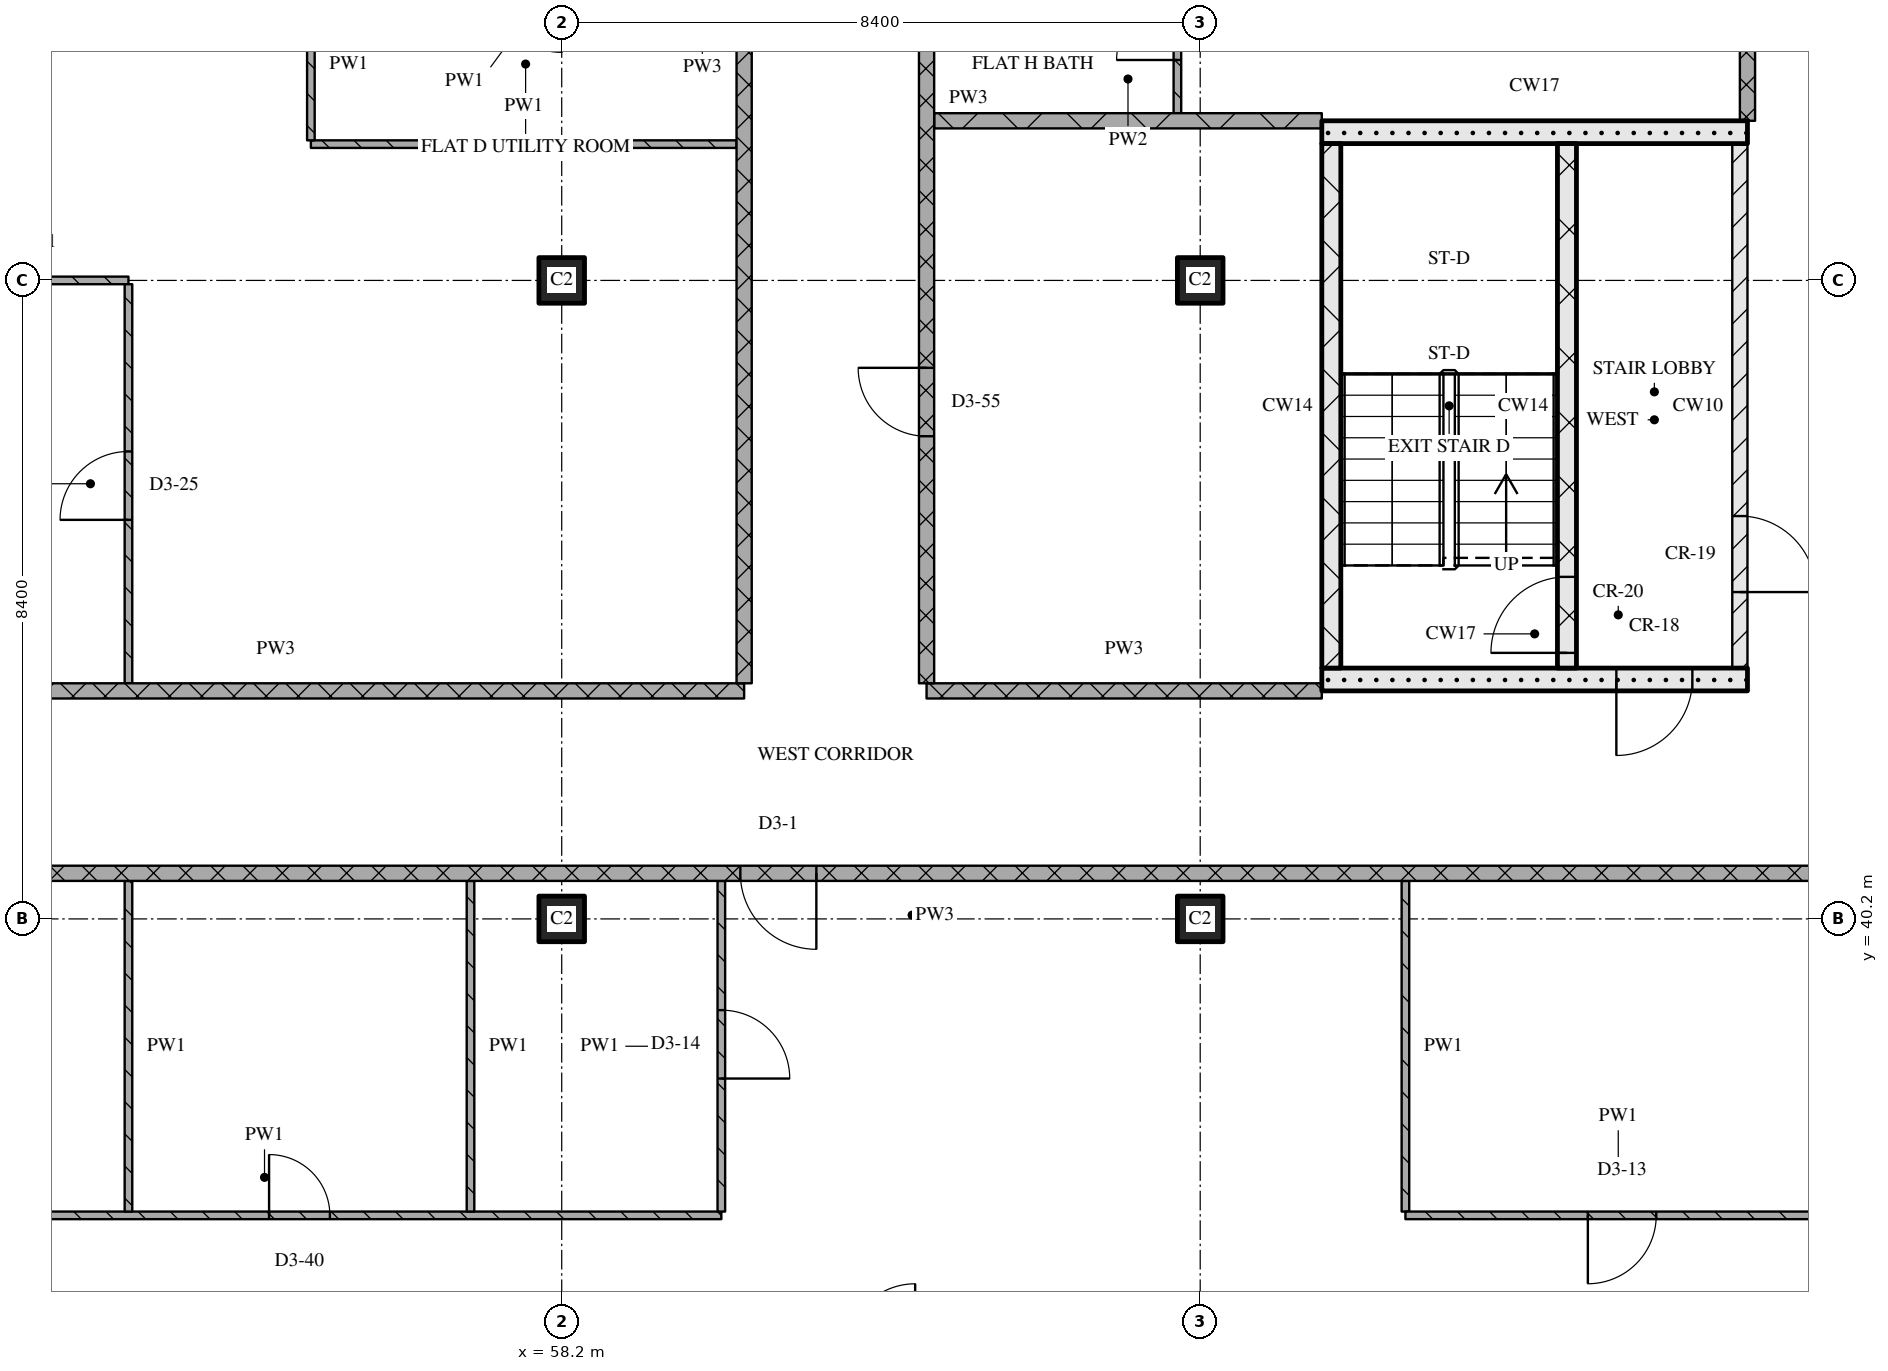
"""IFC4 building model, lengths in metres.
Left out: names, types, materials, properties, quantities, classifications, styles, units other than length and angle.
Written with IfcOpenShell. Run it as: python <this file> out.ifc"""

import sys

from ifc_helpers import new_model, si_unit, direction, frame, frame_2d, origin, origin_2d, place, context, subcontext, project, spatial, rectangle, extrude, element, fill, save


model = new_model("IFC4")
c1 = context("Model", 3, precision=1e-05, world=origin(), true_north=direction((0.0, 1.0)))
c2 = subcontext(c1, "Body", "Model", "MODEL_VIEW")
j1 = project(units=[si_unit("LENGTHUNIT", "METRE"), si_unit("PLANEANGLEUNIT", "RADIAN")], contexts=[c1])
p1 = place(None, origin())
s1 = spatial("IfcSite", under=j1, at=p1, CompositionType="ELEMENT")
p2 = place(p1, origin())
s2 = spatial("IfcBuilding", under=s1, at=p2, CompositionType="ELEMENT")
p3 = place(p2, frame((0.0, 0.0, 234.3)))
s3 = spatial("IfcBuildingStorey", under=s2, at=p3, CompositionType="ELEMENT", Elevation=234.3)
for number, where, z_axis, x_axis in (
    (1, (58.2, 40.2, 0.0), (0.0, 0.0, 1.0), (1.0, 0.0, 0.0)),
    (2, (58.2, 48.6, 0.0), (0.0, 0.0, 1.0), (1.0, 0.0, 0.0)),
    (3, (66.6, 40.2, 0.0), (0.0, 0.0, 1.0), (1.0, 0.0, 0.0)),
    (4, (66.6, 48.6, 0.0), (0.0, 0.0, 1.0), (1.0, 0.0, 0.0)),
):
    element("IfcColumn", number, at=place(p3, frame(where, z_axis=z_axis, x_axis=x_axis)), inside=s3, PredefinedType="COLUMN", context=c2, shape_type="SweptSolid", body=[
        extrude(rectangle(XDim=0.6, YDim=0.6, at=origin_2d()), origin(), (0.0, 0.0, 1.0), 3.6),
    ])
p4 = place(p3, frame((68.2, 43.35, 0.0), z_axis=(0.0, 0.0, 1.0), x_axis=(1.0, 0.0, 0.0)))
e5 = element("IfcWall", 5, at=p4, inside=s3, PredefinedType="SOLIDWALL", context=c2, shape_type="SweptSolid", body=[
    extrude(rectangle(XDim=5.6, YDim=0.3, at=frame_2d((2.8, 0.0))), origin(), (0.0, 0.0, 1.0), 3.32),
])
p5 = place(p4, frame((3.875, 0.0, 0.0)))
e6 = element("IfcOpeningElement", 6, at=p5, cuts=e5, PredefinedType="OPENING", context=c2, shape_type="SweptSolid", body=[
    extrude(rectangle(XDim=1.0, YDim=2.1, at=frame_2d((0.5, 1.05))), frame((0.0, 0.16, 0.0), z_axis=(0.0, -1.0, 0.0), x_axis=(1.0, 0.0, 0.0)), (0.0, 0.0, 1.0), 0.32),
])
p6 = place(p3, frame((68.325, 43.5, 0.0), z_axis=(0.0, 0.0, 1.0), x_axis=(0.0, 1.0, 0.0)))
e7 = element("IfcWall", 7, at=p6, inside=s3, PredefinedType="SOLIDWALL", context=c2, shape_type="SweptSolid", body=[
    extrude(rectangle(XDim=6.9, YDim=0.25, at=frame_2d((3.45, 0.0))), origin(), (0.0, 0.0, 1.0), 3.32),
])
p7 = place(p3, frame((71.425, 43.5, 0.0), z_axis=(0.0, 0.0, 1.0), x_axis=(0.0, 1.0, 0.0)))
e8 = element("IfcWall", 8, at=p7, inside=s3, PredefinedType="SOLIDWALL", context=c2, shape_type="SweptSolid", body=[
    extrude(rectangle(XDim=6.9, YDim=0.25, at=frame_2d((3.45, 0.0))), origin(), (0.0, 0.0, 1.0), 3.32),
])
p8 = place(p7, frame((0.2, 0.0, 0.0)))
e9 = element("IfcOpeningElement", 9, at=p8, cuts=e8, PredefinedType="OPENING", context=c2, shape_type="SweptSolid", body=[
    extrude(rectangle(XDim=1.0, YDim=2.1, at=frame_2d((0.5, 1.05))), frame((0.0, 0.135, 0.0), z_axis=(0.0, -1.0, 0.0), x_axis=(1.0, 0.0, 0.0)), (0.0, 0.0, 1.0), 0.27),
])
p9 = place(p3, frame((73.7, 43.5, 0.0), z_axis=(0.0, 0.0, 1.0), x_axis=(0.0, 1.0, 0.0)))
e10 = element("IfcWall", 10, at=p9, inside=s3, PredefinedType="PARTITIONING", context=c2, shape_type="SweptSolid", body=[
    extrude(rectangle(XDim=6.9, YDim=0.2, at=frame_2d((3.45, 0.0))), origin(), (0.0, 0.0, 1.0), 3.32),
])
p10 = place(p9, frame((1.0, 0.0, 0.0)))
e11 = element("IfcOpeningElement", 11, at=p10, cuts=e10, PredefinedType="OPENING", context=c2, shape_type="SweptSolid", body=[
    extrude(rectangle(XDim=1.0, YDim=2.1, at=frame_2d((0.5, 1.05))), frame((0.0, 0.11, 0.0), z_axis=(0.0, -1.0, 0.0), x_axis=(1.0, 0.0, 0.0)), (0.0, 0.0, 1.0), 0.22),
])
p11 = place(p3, frame((68.2, 50.55, 0.0), z_axis=(0.0, 0.0, 1.0), x_axis=(1.0, 0.0, 0.0)))
e12 = element("IfcWall", 12, at=p11, inside=s3, PredefinedType="SOLIDWALL", context=c2, shape_type="SweptSolid", body=[
    extrude(rectangle(XDim=5.6, YDim=0.3, at=frame_2d((2.8, 0.0))), origin(), (0.0, 0.0, 1.0), 3.32),
])
p12 = place(p3, frame((48.28, 36.3, 0.0), z_axis=(0.0, 0.0, 1.0), x_axis=(1.0, 0.0, 0.0)))
e13 = element("IfcWall", 13, at=p12, inside=s3, PredefinedType="PARTITIONING", context=c2, shape_type="SweptSolid", body=[
    extrude(rectangle(XDim=12.02, YDim=0.1, at=frame_2d((6.01, 0.0))), origin(), (0.0, 0.0, 1.0), 3.32),
])
p13 = place(p12, frame((1.57, 0.0, 0.0)))
e14 = element("IfcOpeningElement", 14, at=p13, cuts=e13, PredefinedType="OPENING", context=c2, shape_type="SweptSolid", body=[
    extrude(rectangle(XDim=0.8, YDim=2.1, at=frame_2d((0.4, 1.05))), frame((0.0, 0.06, 0.0), z_axis=(0.0, -1.0, 0.0), x_axis=(1.0, 0.0, 0.0)), (0.0, 0.0, 1.0), 0.12),
])
p14 = place(p12, frame((6.07, 0.0, 0.0)))
e15 = element("IfcOpeningElement", 15, at=p14, cuts=e13, PredefinedType="OPENING", context=c2, shape_type="SweptSolid", body=[
    extrude(rectangle(XDim=0.8, YDim=2.1, at=frame_2d((0.4, 1.05))), frame((0.0, 0.06, 0.0), z_axis=(0.0, -1.0, 0.0), x_axis=(1.0, 0.0, 0.0)), (0.0, 0.0, 1.0), 0.12),
])
p15 = place(p3, frame((75.0, 40.8, 0.0), z_axis=(0.0, 0.0, 1.0), x_axis=(-1.0, 0.0, 0.0)))
e16 = element("IfcWall", 16, at=p15, inside=s3, PredefinedType="PARTITIONING", context=c2, shape_type="SweptSolid", body=[
    extrude(rectangle(XDim=24.38, YDim=0.2, at=frame_2d((12.19, 0.0))), origin(), (0.0, 0.0, 1.0), 3.32),
])
p16 = place(p15, frame((13.45, 0.0, 0.0)))
e17 = element("IfcOpeningElement", 17, at=p16, cuts=e16, PredefinedType="OPENING", context=c2, shape_type="SweptSolid", body=[
    extrude(rectangle(XDim=1.0, YDim=2.1, at=frame_2d((0.5, 1.05))), frame((0.0, 0.11, 0.0), z_axis=(0.0, -1.0, 0.0), x_axis=(1.0, 0.0, 0.0)), (0.0, 0.0, 1.0), 0.22),
])
p17 = place(p3, frame((48.28, 43.2, 0.0), z_axis=(0.0, 0.0, 1.0), x_axis=(1.0, 0.0, 0.0)))
e18 = element("IfcWall", 18, at=p17, inside=s3, PredefinedType="PARTITIONING", context=c2, shape_type="SweptSolid", body=[
    extrude(rectangle(XDim=12.32, YDim=0.2, at=frame_2d((6.16, 0.0))), origin(), (0.0, 0.0, 1.0), 3.32),
])
p18 = place(p3, frame((63.0, 43.2, 0.0), z_axis=(0.0, 0.0, 1.0), x_axis=(1.0, 0.0, 0.0)))
e19 = element("IfcWall", 19, at=p18, inside=s3, PredefinedType="PARTITIONING", context=c2, shape_type="SweptSolid", body=[
    extrude(rectangle(XDim=5.2, YDim=0.2, at=frame_2d((2.6, 0.0))), origin(), (0.0, 0.0, 1.0), 3.32),
])
p19 = place(p3, frame((50.12, 48.6, 0.0), z_axis=(0.0, 0.0, 1.0), x_axis=(1.0, 0.0, 0.0)))
e20 = element("IfcWall", 20, at=p19, inside=s3, PredefinedType="PARTITIONING", context=c2, shape_type="SweptSolid", body=[
    extrude(rectangle(XDim=2.38, YDim=0.1, at=frame_2d((1.19, 0.0))), origin(), (0.0, 0.0, 1.0), 3.32),
])
p20 = place(p3, frame((54.9, 50.393, 0.0), z_axis=(0.0, 0.0, 1.0), x_axis=(1.0, 0.0, 0.0)))
e21 = element("IfcWall", 21, at=p20, inside=s3, PredefinedType="PARTITIONING", context=c2, shape_type="SweptSolid", body=[
    extrude(rectangle(XDim=5.6, YDim=0.1, at=frame_2d((2.8, 0.0))), origin(), (0.0, 0.0, 1.0), 3.32),
])
p21 = place(p3, frame((63.1, 50.7, 0.0), z_axis=(0.0, 0.0, 1.0), x_axis=(1.0, 0.0, 0.0)))
e22 = element("IfcWall", 22, at=p21, inside=s3, PredefinedType="PARTITIONING", context=c2, shape_type="SweptSolid", body=[
    extrude(rectangle(XDim=5.1, YDim=0.2, at=frame_2d((2.55, 0.0))), origin(), (0.0, 0.0, 1.0), 3.32),
])
p22 = place(p3, frame((52.5, 40.7, 0.0), z_axis=(0.0, 0.0, 1.0), x_axis=(0.0, -1.0, 0.0)))
e23 = element("IfcWall", 23, at=p22, inside=s3, PredefinedType="PARTITIONING", context=c2, shape_type="SweptSolid", body=[
    extrude(rectangle(XDim=4.35, YDim=0.1, at=frame_2d((2.175, 0.0))), origin(), (0.0, 0.0, 1.0), 3.32),
])
p23 = place(p3, frame((52.5, 43.3, 0.0), z_axis=(0.0, 0.0, 1.0), x_axis=(0.0, 1.0, 0.0)))
e24 = element("IfcWall", 24, at=p23, inside=s3, PredefinedType="PARTITIONING", context=c2, shape_type="SweptSolid", body=[
    extrude(rectangle(XDim=5.25, YDim=0.1, at=frame_2d((2.625, 0.0))), origin(), (0.0, 0.0, 1.0), 3.32),
])
p24 = place(p23, frame((2.15, 0.0, 0.0)))
e25 = element("IfcOpeningElement", 25, at=p24, cuts=e24, PredefinedType="OPENING", context=c2, shape_type="SweptSolid", body=[
    extrude(rectangle(XDim=0.9, YDim=2.1, at=frame_2d((0.45, 1.05))), frame((0.0, 0.06, 0.0), z_axis=(0.0, -1.0, 0.0), x_axis=(1.0, 0.0, 0.0)), (0.0, 0.0, 1.0), 0.12),
])
p25 = place(p3, frame((54.9, 52.45, 0.0), z_axis=(0.0, 0.0, 1.0), x_axis=(0.0, -1.0, 0.0)))
e26 = element("IfcWall", 26, at=p25, inside=s3, PredefinedType="PARTITIONING", context=c2, shape_type="SweptSolid", body=[
    extrude(rectangle(XDim=2.007, YDim=0.1, at=frame_2d((1.003, 0.0))), origin(), (0.0, 0.0, 1.0), 3.32),
])
p26 = place(p3, frame((57.0, 40.7, 0.0), z_axis=(0.0, 0.0, 1.0), x_axis=(0.0, -1.0, 0.0)))
e27 = element("IfcWall", 27, at=p26, inside=s3, PredefinedType="PARTITIONING", context=c2, shape_type="SweptSolid", body=[
    extrude(rectangle(XDim=4.35, YDim=0.1, at=frame_2d((2.175, 0.0))), origin(), (0.0, 0.0, 1.0), 3.32),
])
p27 = place(p3, frame((60.3, 36.35, 0.0), z_axis=(0.0, 0.0, 1.0), x_axis=(0.0, 1.0, 0.0)))
e28 = element("IfcWall", 28, at=p27, inside=s3, PredefinedType="PARTITIONING", context=c2, shape_type="SweptSolid", body=[
    extrude(rectangle(XDim=4.35, YDim=0.1, at=frame_2d((2.175, 0.0))), origin(), (0.0, 0.0, 1.0), 3.32),
])
p28 = place(p27, frame((1.75, 0.0, 0.0)))
e29 = element("IfcOpeningElement", 29, at=p28, cuts=e28, PredefinedType="OPENING", context=c2, shape_type="SweptSolid", body=[
    extrude(rectangle(XDim=0.9, YDim=2.1, at=frame_2d((0.45, 1.05))), frame((0.0, 0.06, 0.0), z_axis=(0.0, -1.0, 0.0), x_axis=(1.0, 0.0, 0.0)), (0.0, 0.0, 1.0), 0.12),
])
p29 = place(p3, frame((60.6, 43.3, 0.0), z_axis=(0.0, 0.0, 1.0), x_axis=(0.0, 1.0, 0.0)))
e30 = element("IfcWall", 30, at=p29, inside=s3, PredefinedType="PARTITIONING", context=c2, shape_type="SweptSolid", body=[
    extrude(rectangle(XDim=17.8, YDim=0.2, at=frame_2d((8.9, 0.0))), origin(), (0.0, 0.0, 1.0), 3.32),
])
p30 = place(p29, frame((9.45, 0.0, 0.0)))
e31 = element("IfcOpeningElement", 31, at=p30, cuts=e30, PredefinedType="OPENING", context=c2, shape_type="SweptSolid", body=[
    extrude(rectangle(XDim=1.0, YDim=2.1, at=frame_2d((0.5, 1.05))), frame((0.0, 0.11, 0.0), z_axis=(0.0, -1.0, 0.0), x_axis=(1.0, 0.0, 0.0)), (0.0, 0.0, 1.0), 0.22),
])
p31 = place(p3, frame((63.0, 58.7, 0.0), z_axis=(0.0, 0.0, 1.0), x_axis=(0.0, -1.0, 0.0)))
e32 = element("IfcWall", 32, at=p31, inside=s3, PredefinedType="PARTITIONING", context=c2, shape_type="SweptSolid", body=[
    extrude(rectangle(XDim=15.4, YDim=0.2, at=frame_2d((7.7, 0.0))), origin(), (0.0, 0.0, 1.0), 3.32),
])
p32 = place(p31, frame((4.35, 0.0, 0.0)))
e33 = element("IfcOpeningElement", 33, at=p32, cuts=e32, PredefinedType="OPENING", context=c2, shape_type="SweptSolid", body=[
    extrude(rectangle(XDim=1.0, YDim=2.1, at=frame_2d((0.5, 1.05))), frame((0.0, 0.11, 0.0), z_axis=(0.0, -1.0, 0.0), x_axis=(1.0, 0.0, 0.0)), (0.0, 0.0, 1.0), 0.22),
])
p33 = place(p31, frame((11.25, 0.0, 0.0)))
e34 = element("IfcOpeningElement", 34, at=p33, cuts=e32, PredefinedType="OPENING", context=c2, shape_type="SweptSolid", body=[
    extrude(rectangle(XDim=0.9, YDim=2.1, at=frame_2d((0.45, 1.05))), frame((0.0, 0.11, 0.0), z_axis=(0.0, -1.0, 0.0), x_axis=(1.0, 0.0, 0.0)), (0.0, 0.0, 1.0), 0.22),
])
p34 = place(p3, frame((66.3, 50.8, 0.0), z_axis=(0.0, 0.0, 1.0), x_axis=(0.0, 1.0, 0.0)))
e35 = element("IfcWall", 35, at=p34, inside=s3, PredefinedType="PARTITIONING", context=c2, shape_type="SweptSolid", body=[
    extrude(rectangle(XDim=2.25, YDim=0.1, at=frame_2d((1.125, 0.0))), origin(), (0.0, 0.0, 1.0), 3.32),
])
p35 = place(p34, frame((0.7, 0.0, 0.0)))
e36 = element("IfcOpeningElement", 36, at=p35, cuts=e35, PredefinedType="OPENING", context=c2, shape_type="SweptSolid", body=[
    extrude(rectangle(XDim=0.8, YDim=2.1, at=frame_2d((0.4, 1.05))), frame((0.0, 0.06, 0.0), z_axis=(0.0, -1.0, 0.0), x_axis=(1.0, 0.0, 0.0)), (0.0, 0.0, 1.0), 0.12),
])
p36 = place(p3, frame((69.3, 40.7, 0.0), z_axis=(0.0, 0.0, 1.0), x_axis=(0.0, -1.0, 0.0)))
e37 = element("IfcWall", 37, at=p36, inside=s3, PredefinedType="PARTITIONING", context=c2, shape_type="SweptSolid", body=[
    extrude(rectangle(XDim=4.35, YDim=0.1, at=frame_2d((2.175, 0.0))), origin(), (0.0, 0.0, 1.0), 3.32),
])
p37 = place(p3, frame((73.8, 58.7, 0.0), z_axis=(0.0, 0.0, 1.0), x_axis=(0.0, -1.0, 0.0)))
e38 = element("IfcWall", 38, at=p37, inside=s3, PredefinedType="PARTITIONING", context=c2, shape_type="SweptSolid", body=[
    extrude(rectangle(XDim=8.0, YDim=0.2, at=frame_2d((4.0, 0.0))), origin(), (0.0, 0.0, 1.0), 3.32),
])
p38 = place(p37, frame((1.225, 0.0, 0.9)))
e39 = element("IfcOpeningElement", 39, at=p38, cuts=e38, PredefinedType="OPENING", context=c2, shape_type="SweptSolid", body=[
    extrude(rectangle(XDim=1.5, YDim=1.5, at=frame_2d((0.75, 0.75))), frame((0.0, 0.11, 0.0), z_axis=(0.0, -1.0, 0.0), x_axis=(1.0, 0.0, 0.0)), (0.0, 0.0, 1.0), 0.22),
])
p39 = place(p3, frame((69.3, 36.3, 0.0), z_axis=(0.0, 0.0, 1.0), x_axis=(1.0, 0.0, 0.0)))
e40 = element("IfcWall", 40, at=p39, inside=s3, PredefinedType="PARTITIONING", context=c2, shape_type="SweptSolid", body=[
    extrude(rectangle(XDim=5.6, YDim=0.1, at=frame_2d((2.8, 0.0))), origin(), (0.0, 0.0, 1.0), 3.32),
])
p40 = place(p39, frame((2.4, 0.0, 0.0)))
e41 = element("IfcOpeningElement", 41, at=p40, cuts=e40, PredefinedType="OPENING", context=c2, shape_type="SweptSolid", body=[
    extrude(rectangle(XDim=0.9, YDim=2.1, at=frame_2d((0.45, 1.05))), frame((0.0, 0.06, 0.0), z_axis=(0.0, -1.0, 0.0), x_axis=(1.0, 0.0, 0.0)), (0.0, 0.0, 1.0), 0.12),
])
p41 = place(p5, origin())
e42 = element("IfcDoor", 42, at=p41, inside=s3, OperationType="SINGLE_SWING_RIGHT", PredefinedType="DOOR", context=c2, shape_type="SweptSolid", body=[
    extrude(rectangle(XDim=1.0, YDim=2.1, at=frame_2d((0.5, 1.05))), frame((0.0, 0.025, 0.0), z_axis=(0.0, -1.0, 0.0), x_axis=(1.0, 0.0, 0.0)), (0.0, 0.0, 1.0), 0.05),
])
fill(e6, e42)
p42 = place(p8, origin())
e43 = element("IfcDoor", 43, at=p42, inside=s3, OperationType="SINGLE_SWING_LEFT", PredefinedType="DOOR", context=c2, shape_type="SweptSolid", body=[
    extrude(rectangle(XDim=1.0, YDim=2.1, at=frame_2d((0.5, 1.05))), frame((0.0, 0.025, 0.0), z_axis=(0.0, -1.0, 0.0), x_axis=(1.0, 0.0, 0.0)), (0.0, 0.0, 1.0), 0.05),
])
fill(e9, e43)
p43 = place(p10, origin())
e44 = element("IfcDoor", 44, at=p43, inside=s3, OperationType="SINGLE_SWING_RIGHT", PredefinedType="DOOR", context=c2, shape_type="SweptSolid", body=[
    extrude(rectangle(XDim=1.0, YDim=2.1, at=frame_2d((0.5, 1.05))), frame((0.0, 0.025, 0.0), z_axis=(0.0, -1.0, 0.0), x_axis=(1.0, 0.0, 0.0)), (0.0, 0.0, 1.0), 0.05),
])
fill(e11, e44)
p44 = place(p14, origin())
e45 = element("IfcDoor", 45, at=p44, inside=s3, OperationType="SINGLE_SWING_LEFT", PredefinedType="DOOR", context=c2, shape_type="SweptSolid", body=[
    extrude(rectangle(XDim=0.8, YDim=2.1, at=frame_2d((0.4, 1.05))), frame((0.0, 0.025, 0.0), z_axis=(0.0, -1.0, 0.0), x_axis=(1.0, 0.0, 0.0)), (0.0, 0.0, 1.0), 0.05),
])
fill(e15, e45)
p45 = place(p16, origin())
e46 = element("IfcDoor", 46, at=p45, inside=s3, OperationType="SINGLE_SWING_LEFT", PredefinedType="DOOR", context=c2, shape_type="SweptSolid", body=[
    extrude(rectangle(XDim=1.0, YDim=2.1, at=frame_2d((0.5, 1.05))), frame((0.0, 0.025, 0.0), z_axis=(0.0, -1.0, 0.0), x_axis=(1.0, 0.0, 0.0)), (0.0, 0.0, 1.0), 0.05),
])
fill(e17, e46)
p46 = place(p24, origin())
e47 = element("IfcDoor", 47, at=p46, inside=s3, OperationType="SINGLE_SWING_LEFT", PredefinedType="DOOR", context=c2, shape_type="SweptSolid", body=[
    extrude(rectangle(XDim=0.9, YDim=2.1, at=frame_2d((0.45, 1.05))), frame((0.0, 0.025, 0.0), z_axis=(0.0, -1.0, 0.0), x_axis=(1.0, 0.0, 0.0)), (0.0, 0.0, 1.0), 0.05),
])
fill(e25, e47)
p47 = place(p28, origin())
e48 = element("IfcDoor", 48, at=p47, inside=s3, OperationType="SINGLE_SWING_RIGHT", PredefinedType="DOOR", context=c2, shape_type="SweptSolid", body=[
    extrude(rectangle(XDim=0.9, YDim=2.1, at=frame_2d((0.45, 1.05))), frame((0.0, 0.025, 0.0), z_axis=(0.0, -1.0, 0.0), x_axis=(1.0, 0.0, 0.0)), (0.0, 0.0, 1.0), 0.05),
])
fill(e29, e48)
p48 = place(p33, origin())
e49 = element("IfcDoor", 49, at=p48, inside=s3, OperationType="SINGLE_SWING_RIGHT", PredefinedType="DOOR", context=c2, shape_type="SweptSolid", body=[
    extrude(rectangle(XDim=0.9, YDim=2.1, at=frame_2d((0.45, 1.05))), frame((0.0, 0.025, 0.0), z_axis=(0.0, -1.0, 0.0), x_axis=(1.0, 0.0, 0.0)), (0.0, 0.0, 1.0), 0.05),
])
fill(e34, e49)
p49 = place(p35, origin())
e50 = element("IfcDoor", 50, at=p49, inside=s3, OperationType="SINGLE_SWING_LEFT", PredefinedType="DOOR", context=c2, shape_type="SweptSolid", body=[
    extrude(rectangle(XDim=0.8, YDim=2.1, at=frame_2d((0.4, 1.05))), frame((0.0, 0.025, 0.0), z_axis=(0.0, -1.0, 0.0), x_axis=(1.0, 0.0, 0.0)), (0.0, 0.0, 1.0), 0.05),
])
fill(e36, e50)
p50 = place(p40, origin())
e51 = element("IfcDoor", 51, at=p50, inside=s3, OperationType="SINGLE_SWING_RIGHT", PredefinedType="DOOR", context=c2, shape_type="SweptSolid", body=[
    extrude(rectangle(XDim=0.9, YDim=2.1, at=frame_2d((0.45, 1.05))), frame((0.0, 0.025, 0.0), z_axis=(0.0, -1.0, 0.0), x_axis=(1.0, 0.0, 0.0)), (0.0, 0.0, 1.0), 0.05),
])
fill(e41, e51)
save(model, sys.argv[1])
